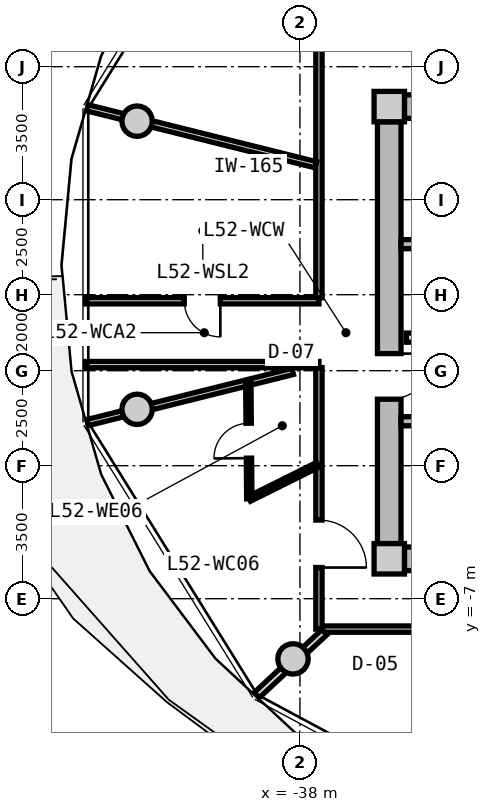
"""IFC4 building model, lengths in metres.
Left out: names, types, materials, properties, quantities, classifications, styles, units other than length and angle.
Written with IfcOpenShell. Run it as: python <this file> out.ifc"""

import sys

from ifc_helpers import new_model, si_unit, direction, frame, frame_2d, origin, origin_2d, place, context, subcontext, project, spatial, rectangle, circle, extrude, source, transform, mapped, element, fill, save


model = new_model("IFC4")
c1 = context("Model", 3, precision=1e-05, world=origin(), true_north=direction((0.0, 1.0)))
c2 = subcontext(c1, "Body", "Model", "MODEL_VIEW")
j1 = project(units=[si_unit("LENGTHUNIT", "METRE"), si_unit("PLANEANGLEUNIT", "RADIAN")], contexts=[c1])
p1 = place(None, origin())
s1 = spatial("IfcSite", under=j1, at=p1, CompositionType="ELEMENT")
p2 = place(p1, origin())
s2 = spatial("IfcBuilding", under=s1, at=p2, CompositionType="ELEMENT")
p3 = place(p2, frame((0.0, 0.0, 167.85)))
s3 = spatial("IfcBuildingStorey", under=s2, at=p3, CompositionType="ELEMENT", Elevation=167.85)
m1 = source(origin(), c2, "Body", "SweptSolid", [
    extrude(rectangle(XDim=0.8, YDim=0.8, at=origin_2d()), origin(), (0.0, 0.0, 1.0), 3.05),
])
for number, where, z_axis, x_axis in (
    (1, (-35.65, -5.95, 0.0), (0.0, 0.0, 1.0), (1.0, 0.0, 0.0)),
    (2, (-35.65, 5.95, 0.0), (0.0, 0.0, 1.0), (1.0, 0.0, 0.0)),
):
    element("IfcColumn", number, at=place(p3, frame(where, z_axis=z_axis, x_axis=x_axis)), inside=s3, PredefinedType="COLUMN", context=c2, shape_type="MappedRepresentation", body=[
        mapped(m1, transform((0.0, 0.0, 0.0), x_axis=(1.0, 0.0, 0.0), y_axis=(0.0, 1.0, 0.0), z_axis=(0.0, 0.0, 1.0), scale=1.0)),
    ])
m2 = source(origin(), c2, "Body", "SweptSolid", [
    extrude(rectangle(XDim=14.5, YDim=0.62, at=frame_2d((7.25, 0.0))), origin(), (0.0, 0.0, 1.0), 2.81),
])
for number, where, z_axis, x_axis in (
    (3, (-35.25, 5.95, 0.0), (0.0, 0.0, 1.0), (1.0, 0.0, 0.0)),
    (4, (-20.75, -5.95, 0.0), (0.0, 0.0, 1.0), (-1.0, 0.0, 0.0)),
):
    element("IfcWall", number, at=place(p3, frame(where, z_axis=z_axis, x_axis=x_axis)), inside=s3, PredefinedType="SHEAR", context=c2, shape_type="MappedRepresentation", body=[
        mapped(m2, transform((0.0, 0.0, 0.0), x_axis=(1.0, 0.0, 0.0), y_axis=(0.0, 1.0, 0.0), z_axis=(0.0, 0.0, 1.0), scale=1.0)),
    ])
m3 = source(origin(), c2, "Body", "SweptSolid", [
    extrude(rectangle(XDim=11.1, YDim=0.62, at=frame_2d((5.55, 0.0))), origin(), (0.0, 0.0, 1.0), 2.81),
])
p4 = place(p3, frame((-35.65, -5.55, 0.0), z_axis=(0.0, 0.0, 1.0), x_axis=(0.0, 1.0, 0.0)))
e5 = element("IfcWall", 5, at=p4, inside=s3, PredefinedType="SHEAR", context=c2, shape_type="MappedRepresentation", body=[
    mapped(m3, transform((0.0, 0.0, 0.0), x_axis=(1.0, 0.0, 0.0), y_axis=(0.0, 1.0, 0.0), z_axis=(0.0, 0.0, 1.0), scale=1.0)),
])
p5 = place(p4, frame((3.8, 0.0, 0.0)))
e6 = element("IfcOpeningElement", 6, at=p5, cuts=e5, PredefinedType="OPENING", context=c2, shape_type="SweptSolid", body=[
    extrude(rectangle(XDim=1.2, YDim=2.15, at=frame_2d((0.6, 1.075))), frame((0.0, 0.32, 0.0), z_axis=(0.0, -1.0, 0.0), x_axis=(1.0, 0.0, 0.0)), (0.0, 0.0, 1.0), 0.64),
])
m4 = source(origin(), c2, "Body", "SweptSolid", [
    extrude(circle(Radius=0.4, at=origin_2d()), origin(), (0.0, 0.0, 1.0), 3.05),
])
for number, where, z_axis, x_axis in (
    (7, (-42.285, 5.567, 0.0), (0.0, 0.0, 1.0), (1.0, 0.0, 0.0)),
    (8, (-42.285, -2.016, 0.0), (0.0, 0.0, 1.0), (1.0, 0.0, 0.0)),
    (9, (-38.183, -8.584, 0.0), (0.0, 0.0, 1.0), (1.0, 0.0, 0.0)),
):
    element("IfcColumn", number, at=place(p3, frame(where, z_axis=z_axis, x_axis=x_axis)), inside=s3, PredefinedType="COLUMN", context=c2, shape_type="MappedRepresentation", body=[
        mapped(m4, transform((0.0, 0.0, 0.0), x_axis=(1.0, 0.0, 0.0), y_axis=(0.0, 1.0, 0.0), z_axis=(0.0, 0.0, 1.0), scale=1.0)),
    ])
m5 = source(origin(), c2, "Body", "SweptSolid", [
    extrude(rectangle(XDim=7.88, YDim=0.24, at=frame_2d((3.94, 0.0))), origin(), (0.0, 0.0, 1.0), 2.81),
])
p6 = place(p3, frame((-35.34, 2.33, 0.0), z_axis=(0.0, 0.0, 1.0), x_axis=(1.0, 0.0, 0.0)))
e10 = element("IfcWall", 10, at=p6, inside=s3, PredefinedType="PARTITIONING", context=c2, shape_type="MappedRepresentation", body=[
    mapped(m5, transform((0.0, 0.0, 0.0), x_axis=(1.0, 0.0, 0.0), y_axis=(0.0, 1.0, 0.0), z_axis=(0.0, 0.0, 1.0), scale=1.0)),
])
p7 = place(p3, frame((-35.34, -2.33, 0.0), z_axis=(0.0, 0.0, 1.0), x_axis=(1.0, 0.0, 0.0)))
e11 = element("IfcWall", 11, at=p7, inside=s3, PredefinedType="PARTITIONING", context=c2, shape_type="MappedRepresentation", body=[
    mapped(m5, transform((0.0, 0.0, 0.0), x_axis=(1.0, 0.0, 0.0), y_axis=(0.0, 1.0, 0.0), z_axis=(0.0, 0.0, 1.0), scale=1.0)),
])
p8 = place(p7, frame((1.0, 0.0, 0.0)))
e12 = element("IfcOpeningElement", 12, at=p8, cuts=e11, PredefinedType="OPENING", context=c2, shape_type="SweptSolid", body=[
    extrude(rectangle(XDim=1.1, YDim=2.15, at=frame_2d((0.55, 1.075))), frame((0.0, 0.13, 0.0), z_axis=(0.0, -1.0, 0.0), x_axis=(1.0, 0.0, 0.0)), (0.0, 0.0, 1.0), 0.26),
])
m6 = source(origin(), c2, "Body", "SweptSolid", [
    extrude(rectangle(XDim=7.62, YDim=0.24, at=frame_2d((3.81, 0.0))), origin(), (0.0, 0.0, 1.0), 2.795),
])
p9 = place(p3, frame((-35.2, -0.13, 0.0), z_axis=(0.0, 0.0, 1.0), x_axis=(1.0, 0.0, 0.0)))
e13 = element("IfcWall", 13, at=p9, inside=s3, PredefinedType="PARTITIONING", context=c2, shape_type="MappedRepresentation", body=[
    mapped(m6, transform((0.0, 0.0, 0.0), x_axis=(1.0, 0.0, 0.0), y_axis=(0.0, 1.0, 0.0), z_axis=(0.0, 0.0, 1.0), scale=1.0)),
])
p10 = place(p9, frame((6.22, 0.0, 0.0)))
e14 = element("IfcOpeningElement", 14, at=p10, cuts=e13, PredefinedType="OPENING", context=c2, shape_type="SweptSolid", body=[
    extrude(rectangle(XDim=1.0, YDim=2.1, at=frame_2d((0.5, 1.05))), frame((0.0, 0.13, 0.0), z_axis=(0.0, -1.0, 0.0), x_axis=(1.0, 0.0, 0.0)), (0.0, 0.0, 1.0), 0.26),
])
p11 = place(p9, frame((2.4, 0.0, 0.0)))
e15 = element("IfcOpeningElement", 15, at=p11, cuts=e13, PredefinedType="OPENING", context=c2, shape_type="SweptSolid", body=[
    extrude(rectangle(XDim=1.0, YDim=2.1, at=frame_2d((0.5, 1.05))), frame((0.0, 0.13, 0.0), z_axis=(0.0, -1.0, 0.0), x_axis=(1.0, 0.0, 0.0)), (0.0, 0.0, 1.0), 0.26),
])
m7 = source(origin(), c2, "Body", "SweptSolid", [
    extrude(rectangle(XDim=19.0, YDim=0.165, at=frame_2d((9.5, 0.0))), origin(), (0.0, 0.0, 1.0), 2.795),
])
p12 = place(p3, frame((-18.5, -7.8, 0.0), z_axis=(0.0, 0.0, 1.0), x_axis=(-1.0, 0.0, 0.0)))
e16 = element("IfcWall", 16, at=p12, inside=s3, PredefinedType="PARTITIONING", context=c2, shape_type="MappedRepresentation", body=[
    mapped(m7, transform((0.0, 0.0, 0.0), x_axis=(1.0, 0.0, 0.0), y_axis=(0.0, 1.0, 0.0), z_axis=(0.0, 0.0, 1.0), scale=1.0)),
])
p13 = place(p12, frame((8.875, 0.0, 0.0)))
e17 = element("IfcOpeningElement", 17, at=p13, cuts=e16, PredefinedType="OPENING", context=c2, shape_type="SweptSolid", body=[
    extrude(rectangle(XDim=1.25, YDim=2.2, at=frame_2d((0.625, 1.1))), frame((0.0, 0.093, 0.0), z_axis=(0.0, -1.0, 0.0), x_axis=(1.0, 0.0, 0.0)), (0.0, 0.0, 1.0), 0.185),
])
m8 = source(origin(), c2, "Body", "SweptSolid", [
    extrude(rectangle(XDim=6.88, YDim=0.165, at=frame_2d((3.44, 0.0))), origin(), (0.0, 0.0, 1.0), 2.795),
])
p14 = place(p3, frame((-37.5, -7.8, 0.0), z_axis=(0.0, 0.0, 1.0), x_axis=(0.0, 1.0, 0.0)))
e18 = element("IfcWall", 18, at=p14, inside=s3, PredefinedType="PARTITIONING", context=c2, shape_type="MappedRepresentation", body=[
    mapped(m8, transform((0.0, 0.0, 0.0), x_axis=(1.0, 0.0, 0.0), y_axis=(0.0, 1.0, 0.0), z_axis=(0.0, 0.0, 1.0), scale=1.0)),
])
p15 = place(p14, frame((1.62, 0.0, 0.0)))
e19 = element("IfcOpeningElement", 19, at=p15, cuts=e18, PredefinedType="OPENING", context=c2, shape_type="SweptSolid", body=[
    extrude(rectangle(XDim=1.25, YDim=2.2, at=frame_2d((0.625, 1.1))), frame((0.0, 0.093, 0.0), z_axis=(0.0, -1.0, 0.0), x_axis=(1.0, 0.0, 0.0)), (0.0, 0.0, 1.0), 0.185),
])
p16 = place(p3, frame((-37.5, 0.92, 0.0), z_axis=(0.0, 0.0, 1.0), x_axis=(0.0, 1.0, 0.0)))
e20 = element("IfcWall", 20, at=p16, inside=s3, PredefinedType="PARTITIONING", context=c2, shape_type="MappedRepresentation", body=[
    mapped(m8, transform((0.0, 0.0, 0.0), x_axis=(1.0, 0.0, 0.0), y_axis=(0.0, 1.0, 0.0), z_axis=(0.0, 0.0, 1.0), scale=1.0)),
])
m9 = source(origin(), c2, "Body", "SweptSolid", [
    extrude(rectangle(XDim=6.193, YDim=0.165, at=frame_2d((3.096, 0.0))), origin(), (0.0, 0.0, 1.0), 2.345),
])
p17 = place(p3, frame((-37.58, 4.419, 0.0), z_axis=(0.0, 0.0, 1.0), x_axis=(-0.970309243466, 0.241867674657, 0.0)))
e21 = element("IfcWall", 21, at=p17, inside=s3, PredefinedType="PARTITIONING", context=c2, shape_type="MappedRepresentation", body=[
    mapped(m9, transform((0.0, 0.0, 0.0), x_axis=(1.0, 0.0, 0.0), y_axis=(0.0, 1.0, 0.0), z_axis=(0.0, 0.0, 1.0), scale=1.0)),
])
m10 = source(origin(), c2, "Body", "SweptSolid", [
    extrude(rectangle(XDim=5.564, YDim=0.165, at=frame_2d((2.782, 0.0))), origin(), (0.0, 0.0, 1.0), 2.345),
])
p18 = place(p3, frame((-38.19, -1.02, 0.0), z_axis=(0.0, 0.0, 1.0), x_axis=(-0.97031260977, -0.241854169533, 0.0)))
e22 = element("IfcWall", 22, at=p18, inside=s3, PredefinedType="PARTITIONING", context=c2, shape_type="MappedRepresentation", body=[
    mapped(m10, transform((0.0, 0.0, 0.0), x_axis=(1.0, 0.0, 0.0), y_axis=(0.0, 1.0, 0.0), z_axis=(0.0, 0.0, 1.0), scale=1.0)),
])
m11 = source(origin(), c2, "Body", "SweptSolid", [
    extrude(rectangle(XDim=6.139, YDim=0.165, at=frame_2d((3.069, 0.0))), origin(), (0.0, 0.0, 1.0), 2.795),
])
p19 = place(p3, frame((-43.639, 0.84, 0.0), z_axis=(0.0, 0.0, 1.0), x_axis=(1.0, 0.0, 0.0)))
e23 = element("IfcWall", 23, at=p19, inside=s3, PredefinedType="PARTITIONING", context=c2, shape_type="MappedRepresentation", body=[
    mapped(m11, transform((0.0, 0.0, 0.0), x_axis=(1.0, 0.0, 0.0), y_axis=(0.0, 1.0, 0.0), z_axis=(0.0, 0.0, 1.0), scale=1.0)),
])
p20 = place(p19, frame((2.594, 0.0, 0.0)))
e24 = element("IfcOpeningElement", 24, at=p20, cuts=e23, PredefinedType="OPENING", context=c2, shape_type="SweptSolid", body=[
    extrude(rectangle(XDim=0.95, YDim=2.1, at=frame_2d((0.475, 1.05))), frame((0.0, 0.093, 0.0), z_axis=(0.0, -1.0, 0.0), x_axis=(1.0, 0.0, 0.0)), (0.0, 0.0, 1.0), 0.185),
])
p21 = place(p3, frame((-37.5, -0.84, 0.0), z_axis=(0.0, 0.0, 1.0), x_axis=(-1.0, 0.0, 0.0)))
e25 = element("IfcWall", 25, at=p21, inside=s3, PredefinedType="PARTITIONING", context=c2, shape_type="MappedRepresentation", body=[
    mapped(m11, transform((0.0, 0.0, 0.0), x_axis=(1.0, 0.0, 0.0), y_axis=(0.0, 1.0, 0.0), z_axis=(0.0, 0.0, 1.0), scale=1.0)),
])
m12 = source(origin(), c2, "Body", "SweptSolid", [
    extrude(rectangle(XDim=2.435, YDim=0.19, at=frame_2d((1.217, 0.0))), origin(), (0.0, 0.0, 1.0), 2.345),
])
p22 = place(p3, frame((-37.354, -7.88, 0.0), z_axis=(0.0, 0.0, 1.0), x_axis=(-0.732164643118, -0.681127693878, 0.0)))
e26 = element("IfcWall", 26, at=p22, inside=s3, PredefinedType="PARTITIONING", context=c2, shape_type="MappedRepresentation", body=[
    mapped(m12, transform((0.0, 0.0, 0.0), x_axis=(1.0, 0.0, 0.0), y_axis=(0.0, 1.0, 0.0), z_axis=(0.0, 0.0, 1.0), scale=1.0)),
])
m13 = source(origin(), c2, "Body", "SweptSolid", [
    extrude(rectangle(XDim=2.013, YDim=0.14, at=frame_2d((1.006, 0.0))), origin(), (0.0, 0.0, 1.0), 2.795),
])
p23 = place(p3, frame((-37.53, -3.476, 0.0), z_axis=(0.0, 0.0, 1.0), x_axis=(-0.895347078862, -0.445369069843, 0.0)))
e27 = element("IfcWall", 27, at=p23, inside=s3, PredefinedType="PARTITIONING", context=c2, shape_type="MappedRepresentation", body=[
    mapped(m13, transform((0.0, 0.0, 0.0), x_axis=(1.0, 0.0, 0.0), y_axis=(0.0, 1.0, 0.0), z_axis=(0.0, 0.0, 1.0), scale=1.0)),
])
m14 = source(origin(), c2, "Body", "SweptSolid", [
    extrude(rectangle(XDim=3.062, YDim=0.14, at=frame_2d((1.531, 0.0))), origin(), (0.0, 0.0, 1.0), 2.795),
])
p24 = place(p3, frame((-39.332, -4.372, 0.0), z_axis=(0.0, 0.0, 1.0), x_axis=(-0.008691856662, 0.9999622251, 0.0)))
e28 = element("IfcWall", 28, at=p24, inside=s3, PredefinedType="PARTITIONING", context=c2, shape_type="MappedRepresentation", body=[
    mapped(m14, transform((0.0, 0.0, 0.0), x_axis=(1.0, 0.0, 0.0), y_axis=(0.0, 1.0, 0.0), z_axis=(0.0, 0.0, 1.0), scale=1.0)),
])
p25 = place(p24, frame((1.071, 0.0, 0.0)))
e29 = element("IfcOpeningElement", 29, at=p25, cuts=e28, PredefinedType="OPENING", context=c2, shape_type="SweptSolid", body=[
    extrude(rectangle(XDim=0.92, YDim=2.1, at=frame_2d((0.46, 1.05))), frame((0.0, 0.08, 0.0), z_axis=(0.0, -1.0, 0.0), x_axis=(1.0, 0.0, 0.0)), (0.0, 0.0, 1.0), 0.16),
])
m15 = source(origin(), c2, "Body", "SweptSolid", [
    extrude(rectangle(XDim=1.2, YDim=2.15, at=frame_2d((0.6, 1.075))), frame((0.0, 0.025, 0.0), z_axis=(0.0, -1.0, 0.0), x_axis=(1.0, 0.0, 0.0)), (0.0, 0.0, 1.0), 0.05),
])
p26 = place(p5, frame((1.2, 0.0, 0.0), z_axis=(0.0, 0.0, 1.0), x_axis=(-1.0, 0.0, 0.0)))
e30 = element("IfcDoor", 30, at=p26, inside=s3, OperationType="SINGLE_SWING_LEFT", PredefinedType="DOOR", context=c2, shape_type="MappedRepresentation", body=[
    mapped(m15, transform((0.0, 0.0, 0.0), x_axis=(1.0, 0.0, 0.0), y_axis=(0.0, 1.0, 0.0), z_axis=(0.0, 0.0, 1.0), scale=1.0)),
])
fill(e6, e30)
m16 = source(origin(), c2, "Body", "SweptSolid", [
    extrude(rectangle(XDim=0.95, YDim=2.1, at=frame_2d((0.475, 1.05))), frame((0.0, 0.025, 0.0), z_axis=(0.0, -1.0, 0.0), x_axis=(1.0, 0.0, 0.0)), (0.0, 0.0, 1.0), 0.05),
])
p27 = place(p20, frame((0.95, 0.0, 0.0), z_axis=(0.0, 0.0, 1.0), x_axis=(-1.0, 0.0, 0.0)))
e31 = element("IfcDoor", 31, at=p27, inside=s3, OperationType="SINGLE_SWING_LEFT", PredefinedType="DOOR", context=c2, shape_type="MappedRepresentation", body=[
    mapped(m16, transform((0.0, 0.0, 0.0), x_axis=(1.0, 0.0, 0.0), y_axis=(0.0, 1.0, 0.0), z_axis=(0.0, 0.0, 1.0), scale=1.0)),
])
fill(e24, e31)
m17 = source(origin(), c2, "Body", "SweptSolid", [
    extrude(rectangle(XDim=1.25, YDim=2.2, at=frame_2d((0.625, 1.1))), frame((0.0, 0.025, 0.0), z_axis=(0.0, -1.0, 0.0), x_axis=(1.0, 0.0, 0.0)), (0.0, 0.0, 1.0), 0.05),
])
p28 = place(p15, frame((1.25, 0.0, 0.0), z_axis=(0.0, 0.0, 1.0), x_axis=(-1.0, 0.0, 0.0)))
e32 = element("IfcDoor", 32, at=p28, inside=s3, OperationType="SINGLE_SWING_RIGHT", PredefinedType="DOOR", context=c2, shape_type="MappedRepresentation", body=[
    mapped(m17, transform((0.0, 0.0, 0.0), x_axis=(1.0, 0.0, 0.0), y_axis=(0.0, 1.0, 0.0), z_axis=(0.0, 0.0, 1.0), scale=1.0)),
])
fill(e19, e32)
m18 = source(origin(), c2, "Body", "SweptSolid", [
    extrude(rectangle(XDim=0.92, YDim=2.1, at=frame_2d((0.46, 1.05))), frame((0.0, 0.025, 0.0), z_axis=(0.0, -1.0, 0.0), x_axis=(1.0, 0.0, 0.0)), (0.0, 0.0, 1.0), 0.05),
])
p29 = place(p25, origin())
e33 = element("IfcDoor", 33, at=p29, inside=s3, OperationType="SINGLE_SWING_LEFT", PredefinedType="DOOR", context=c2, shape_type="MappedRepresentation", body=[
    mapped(m18, transform((0.0, 0.0, 0.0), x_axis=(1.0, 0.0, 0.0), y_axis=(0.0, 1.0, 0.0), z_axis=(0.0, 0.0, 1.0), scale=1.0)),
])
fill(e29, e33)
save(model, sys.argv[1])
